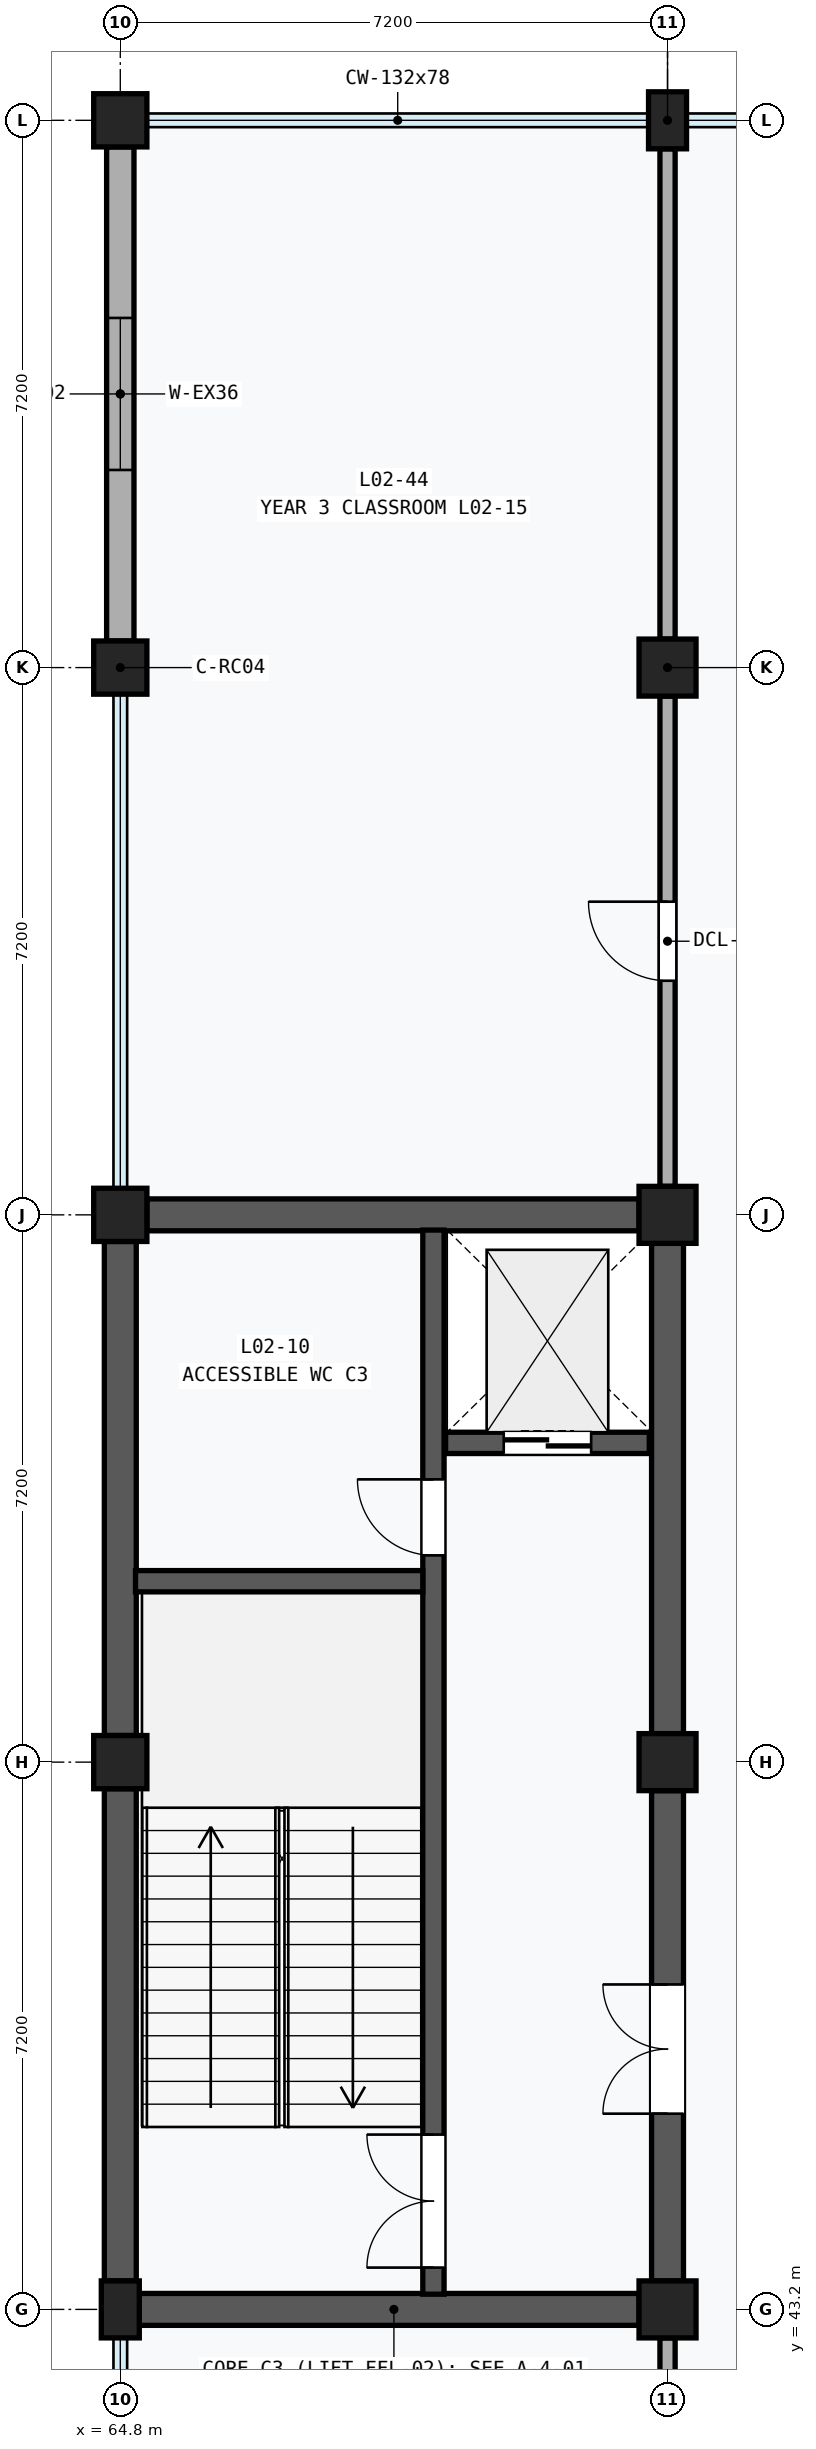
"""IFC4 building model, lengths in metres.
Left out: names, types, materials, properties, quantities, classifications, styles, units other than length and angle.
Written with IfcOpenShell. Run it as: python <this file> out.ifc"""

import sys

from ifc_helpers import new_model, si_unit, direction, frame, frame_2d, origin, origin_2d, place, context, subcontext, project, spatial, rectangle, extrude, element, fill, save


model = new_model("IFC4")
c1 = context("Model", 3, precision=1e-05, world=origin(), true_north=direction((0.0, 1.0)))
c2 = subcontext(c1, "Body", "Model", "MODEL_VIEW")
j1 = project(units=[si_unit("LENGTHUNIT", "METRE"), si_unit("PLANEANGLEUNIT", "RADIAN")], contexts=[c1])
p1 = place(None, origin())
s1 = spatial("IfcSite", under=j1, at=p1, CompositionType="ELEMENT")
p2 = place(p1, origin())
s2 = spatial("IfcBuilding", under=s1, at=p2, CompositionType="ELEMENT")
p3 = place(p2, frame((0.0, 0.0, 9.6)))
s3 = spatial("IfcBuildingStorey", under=s2, at=p3, CompositionType="ELEMENT", Elevation=9.6)
p4 = place(p3, frame((64.8, 43.2, 0.0), z_axis=(0.0, 0.0, 1.0), x_axis=(1.0, 0.0, 0.0)))
e1 = element("IfcColumn", 1, at=p4, inside=s3, PredefinedType="PILASTER", context=c2, shape_type="SweptSolid", body=[
    extrude(rectangle(XDim=0.5, YDim=0.75, at=origin_2d()), origin(), (0.0, 0.0, 1.0), 4.8),
])
for number, where, z_axis, x_axis in (
    (2, (64.8, 50.4, 0.0), (0.0, 0.0, 1.0), (1.0, 0.0, 0.0)),
    (3, (64.8, 57.6, 0.0), (0.0, 0.0, 1.0), (1.0, 0.0, 0.0)),
    (4, (64.8, 64.8, 0.0), (0.0, 0.0, 1.0), (1.0, 0.0, 0.0)),
    (5, (64.8, 72.0, 0.0), (0.0, 0.0, 1.0), (1.0, 0.0, 0.0)),
):
    element("IfcColumn", number, at=place(p3, frame(where, z_axis=z_axis, x_axis=x_axis)), inside=s3, PredefinedType="COLUMN", context=c2, shape_type="SweptSolid", body=[
        extrude(rectangle(XDim=0.7, YDim=0.7, at=origin_2d()), origin(), (0.0, 0.0, 1.0), 4.8),
    ])
for number, where, z_axis, x_axis in (
    (6, (72.0, 43.2, 0.0), (0.0, 0.0, 1.0), (1.0, 0.0, 0.0)),
    (7, (72.0, 50.4, 0.0), (0.0, 0.0, 1.0), (1.0, 0.0, 0.0)),
    (8, (72.0, 57.6, 0.0), (0.0, 0.0, 1.0), (1.0, 0.0, 0.0)),
    (9, (72.0, 64.8, 0.0), (0.0, 0.0, 1.0), (1.0, 0.0, 0.0)),
):
    element("IfcColumn", number, at=place(p3, frame(where, z_axis=z_axis, x_axis=x_axis)), inside=s3, PredefinedType="COLUMN", context=c2, shape_type="SweptSolid", body=[
        extrude(rectangle(XDim=0.75, YDim=0.75, at=origin_2d()), origin(), (0.0, 0.0, 1.0), 4.8),
    ])
p5 = place(p3, frame((72.0, 72.0, 0.0), z_axis=(0.0, 0.0, 1.0), x_axis=(1.0, 0.0, 0.0)))
e10 = element("IfcColumn", 10, at=p5, inside=s3, PredefinedType="PILASTER", context=c2, shape_type="SweptSolid", body=[
    extrude(rectangle(XDim=0.5, YDim=0.75, at=origin_2d()), origin(), (0.0, 0.0, 1.0), 4.8),
])
p6 = place(p3, frame((64.8, 65.15, 0.0), z_axis=(0.0, 0.0, 1.0), x_axis=(0.0, 1.0, 0.0)))
e11 = element("IfcWall", 11, at=p6, inside=s3, PredefinedType="SOLIDWALL", context=c2, shape_type="SweptSolid", body=[
    extrude(rectangle(XDim=6.5, YDim=0.36, at=frame_2d((3.25, 0.0))), origin(), (0.0, 0.0, 1.0), 3.88),
])
p7 = place(p6, frame((2.25, 0.0, 0.9)))
e12 = element("IfcOpeningElement", 12, at=p7, cuts=e11, PredefinedType="OPENING", context=c2, shape_type="SweptSolid", body=[
    extrude(rectangle(XDim=2.0, YDim=1.8, at=frame_2d((1.0, 0.9))), frame((0.0, 0.192, 0.0), z_axis=(0.0, -1.0, 0.0), x_axis=(1.0, 0.0, 0.0)), (0.0, 0.0, 1.0), 0.384),
])
p8 = place(p3, frame((64.8, 43.575, 0.0), z_axis=(0.0, 0.0, 1.0), x_axis=(0.0, 1.0, 0.0)))
e13 = element("IfcWall", 13, at=p8, inside=s3, PredefinedType="SHEAR", context=c2, shape_type="SweptSolid", body=[
    extrude(rectangle(XDim=6.475, YDim=0.42, at=frame_2d((3.238, 0.0))), origin(), (0.0, 0.0, 1.0), 3.88),
])
p9 = place(p3, frame((64.8, 50.75, 0.0), z_axis=(0.0, 0.0, 1.0), x_axis=(0.0, 1.0, 0.0)))
e14 = element("IfcWall", 14, at=p9, inside=s3, PredefinedType="SHEAR", context=c2, shape_type="SweptSolid", body=[
    extrude(rectangle(XDim=6.5, YDim=0.42, at=frame_2d((3.25, 0.0))), origin(), (0.0, 0.0, 1.0), 3.88),
])
p10 = place(p3, frame((72.0, 43.575, 0.0), z_axis=(0.0, 0.0, 1.0), x_axis=(0.0, 1.0, 0.0)))
e15 = element("IfcWall", 15, at=p10, inside=s3, PredefinedType="SHEAR", context=c2, shape_type="SweptSolid", body=[
    extrude(rectangle(XDim=6.45, YDim=0.42, at=frame_2d((3.225, 0.0))), origin(), (0.0, 0.0, 1.0), 3.74),
])
p11 = place(p10, frame((2.2, 0.0, 0.0)))
e16 = element("IfcOpeningElement", 16, at=p11, cuts=e15, PredefinedType="OPENING", context=c2, shape_type="SweptSolid", body=[
    extrude(rectangle(XDim=1.7, YDim=2.25, at=frame_2d((0.85, 1.125))), frame((0.0, 0.222, 0.0), z_axis=(0.0, -1.0, 0.0), x_axis=(1.0, 0.0, 0.0)), (0.0, 0.0, 1.0), 0.444),
])
p12 = place(p3, frame((72.0, 50.775, 0.0), z_axis=(0.0, 0.0, 1.0), x_axis=(0.0, 1.0, 0.0)))
e17 = element("IfcWall", 17, at=p12, inside=s3, PredefinedType="SHEAR", context=c2, shape_type="SweptSolid", body=[
    extrude(rectangle(XDim=6.45, YDim=0.42, at=frame_2d((3.225, 0.0))), origin(), (0.0, 0.0, 1.0), 3.74),
])
p13 = place(p3, frame((65.05, 43.2, 0.0), z_axis=(0.0, 0.0, 1.0), x_axis=(1.0, 0.0, 0.0)))
e18 = element("IfcWall", 18, at=p13, inside=s3, PredefinedType="SHEAR", context=c2, shape_type="SweptSolid", body=[
    extrude(rectangle(XDim=6.575, YDim=0.42, at=frame_2d((3.288, 0.0))), origin(), (0.0, 0.0, 1.0), 3.74),
])
p14 = place(p3, frame((65.15, 57.6, 0.0), z_axis=(0.0, 0.0, 1.0), x_axis=(1.0, 0.0, 0.0)))
e19 = element("IfcWall", 19, at=p14, inside=s3, PredefinedType="SHEAR", context=c2, shape_type="SweptSolid", body=[
    extrude(rectangle(XDim=6.475, YDim=0.42, at=frame_2d((3.238, 0.0))), origin(), (0.0, 0.0, 1.0), 3.74),
])
p15 = place(p3, frame((68.92, 43.4, 0.0), z_axis=(0.0, 0.0, 1.0), x_axis=(0.0, 1.0, 0.0)))
e20 = element("IfcWall", 20, at=p15, inside=s3, PredefinedType="SHEAR", context=c2, shape_type="SweptSolid", body=[
    extrude(rectangle(XDim=14.0, YDim=0.28, at=frame_2d((7.0, 0.0))), origin(), (0.0, 0.0, 1.0), 4.51),
])
p16 = place(p15, frame((0.35, 0.0, 0.0)))
e21 = element("IfcOpeningElement", 21, at=p16, cuts=e20, PredefinedType="OPENING", context=c2, shape_type="SweptSolid", body=[
    extrude(rectangle(XDim=1.75, YDim=2.15, at=frame_2d((0.875, 1.075))), frame((0.0, 0.152, 0.0), z_axis=(0.0, -1.0, 0.0), x_axis=(1.0, 0.0, 0.0)), (0.0, 0.0, 1.0), 0.304),
])
p17 = place(p15, frame((9.72, 0.0, 0.0)))
e22 = element("IfcOpeningElement", 22, at=p17, cuts=e20, PredefinedType="OPENING", context=c2, shape_type="SweptSolid", body=[
    extrude(rectangle(XDim=1.0, YDim=2.15, at=frame_2d((0.5, 1.075))), frame((0.0, 0.152, 0.0), z_axis=(0.0, -1.0, 0.0), x_axis=(1.0, 0.0, 0.0)), (0.0, 0.0, 1.0), 0.304),
])
p18 = place(p3, frame((65.0, 52.78, 0.0), z_axis=(0.0, 0.0, 1.0), x_axis=(1.0, 0.0, 0.0)))
e23 = element("IfcWall", 23, at=p18, inside=s3, PredefinedType="SHEAR", context=c2, shape_type="SweptSolid", body=[
    extrude(rectangle(XDim=3.78, YDim=0.28, at=frame_2d((1.89, 0.0))), origin(), (0.0, 0.0, 1.0), 4.51),
])
p19 = place(p3, frame((69.08, 54.6, 0.0), z_axis=(0.0, 0.0, 1.0), x_axis=(1.0, 0.0, 0.0)))
e24 = element("IfcWall", 24, at=p19, inside=s3, PredefinedType="SHEAR", context=c2, shape_type="SweptSolid", body=[
    extrude(rectangle(XDim=2.68, YDim=0.28, at=frame_2d((1.34, 0.0))), origin(), (0.0, 0.0, 1.0), 4.51),
])
p20 = place(p19, frame((0.765, 0.0, 0.0)))
e25 = element("IfcOpeningElement", 25, at=p20, cuts=e24, PredefinedType="OPENING", context=c2, shape_type="SweptSolid", body=[
    extrude(rectangle(XDim=1.15, YDim=2.2, at=frame_2d((0.575, 1.1))), frame((0.0, 0.152, 0.0), z_axis=(0.0, -1.0, 0.0), x_axis=(1.0, 0.0, 0.0)), (0.0, 0.0, 1.0), 0.304),
])
p21 = place(p3, frame((72.0, 36.375, 0.0), z_axis=(0.0, 0.0, 1.0), x_axis=(0.0, 1.0, 0.0)))
e26 = element("IfcWall", 26, at=p21, inside=s3, PredefinedType="PARTITIONING", context=c2, shape_type="SweptSolid", body=[
    extrude(rectangle(XDim=6.45, YDim=0.2, at=frame_2d((3.225, 0.0))), origin(), (0.0, 0.0, 1.0), 3.74),
])
p22 = place(p3, frame((72.0, 57.975, 0.0), z_axis=(0.0, 0.0, 1.0), x_axis=(0.0, 1.0, 0.0)))
e27 = element("IfcWall", 27, at=p22, inside=s3, PredefinedType="PARTITIONING", context=c2, shape_type="SweptSolid", body=[
    extrude(rectangle(XDim=6.45, YDim=0.2, at=frame_2d((3.225, 0.0))), origin(), (0.0, 0.0, 1.0), 3.74),
])
p23 = place(p22, frame((2.705, 0.0, 0.0)))
e28 = element("IfcOpeningElement", 28, at=p23, cuts=e27, PredefinedType="OPENING", context=c2, shape_type="SweptSolid", body=[
    extrude(rectangle(XDim=1.04, YDim=2.14, at=frame_2d((0.52, 1.07))), frame((0.0, 0.112, 0.0), z_axis=(0.0, -1.0, 0.0), x_axis=(1.0, 0.0, 0.0)), (0.0, 0.0, 1.0), 0.224),
])
p24 = place(p3, frame((72.0, 65.175, 0.0), z_axis=(0.0, 0.0, 1.0), x_axis=(0.0, 1.0, 0.0)))
e29 = element("IfcWall", 29, at=p24, inside=s3, PredefinedType="PARTITIONING", context=c2, shape_type="SweptSolid", body=[
    extrude(rectangle(XDim=6.45, YDim=0.2, at=frame_2d((3.225, 0.0))), origin(), (0.0, 0.0, 1.0), 3.74),
])
p25 = place(p7, origin())
e30 = element("IfcWindow", 30, at=p25, inside=s3, PartitioningType="SINGLE_PANEL", PredefinedType="WINDOW", context=c2, shape_type="SweptSolid", body=[
    extrude(rectangle(XDim=2.0, YDim=1.8, at=frame_2d((1.0, 0.9))), frame((0.0, 0.03, 0.0), z_axis=(0.0, -1.0, 0.0), x_axis=(1.0, 0.0, 0.0)), (0.0, 0.0, 1.0), 0.06),
])
fill(e12, e30)
p26 = place(p11, origin())
e31 = element("IfcDoor", 31, at=p26, inside=s3, OperationType="DOUBLE_DOOR_SINGLE_SWING", PredefinedType="DOOR", context=c2, shape_type="SweptSolid", body=[
    extrude(rectangle(XDim=1.7, YDim=2.25, at=frame_2d((0.85, 1.125))), frame((0.0, 0.025, 0.0), z_axis=(0.0, -1.0, 0.0), x_axis=(1.0, 0.0, 0.0)), (0.0, 0.0, 1.0), 0.05),
])
fill(e16, e31)
p27 = place(p16, origin())
e32 = element("IfcDoor", 32, at=p27, inside=s3, OperationType="DOUBLE_DOOR_SINGLE_SWING", PredefinedType="DOOR", context=c2, shape_type="SweptSolid", body=[
    extrude(rectangle(XDim=1.75, YDim=2.15, at=frame_2d((0.875, 1.075))), frame((0.0, 0.025, 0.0), z_axis=(0.0, -1.0, 0.0), x_axis=(1.0, 0.0, 0.0)), (0.0, 0.0, 1.0), 0.05),
])
fill(e21, e32)
p28 = place(p17, origin())
e33 = element("IfcDoor", 33, at=p28, inside=s3, OperationType="SINGLE_SWING_RIGHT", PredefinedType="DOOR", context=c2, shape_type="SweptSolid", body=[
    extrude(rectangle(XDim=1.0, YDim=2.15, at=frame_2d((0.5, 1.075))), frame((0.0, 0.025, 0.0), z_axis=(0.0, -1.0, 0.0), x_axis=(1.0, 0.0, 0.0)), (0.0, 0.0, 1.0), 0.05),
])
fill(e22, e33)
p29 = place(p20, frame((1.15, 0.0, 0.0), z_axis=(0.0, 0.0, 1.0), x_axis=(-1.0, 0.0, 0.0)))
e34 = element("IfcDoor", 34, at=p29, inside=s3, OperationType="DOUBLE_DOOR_SLIDING", PredefinedType="DOOR", context=c2, shape_type="SweptSolid", body=[
    extrude(rectangle(XDim=1.15, YDim=2.2, at=frame_2d((0.575, 1.1))), frame((0.0, 0.025, 0.0), z_axis=(0.0, -1.0, 0.0), x_axis=(1.0, 0.0, 0.0)), (0.0, 0.0, 1.0), 0.05),
])
fill(e25, e34)
p30 = place(p23, origin())
e35 = element("IfcDoor", 35, at=p30, inside=s3, OperationType="SINGLE_SWING_RIGHT", PredefinedType="DOOR", context=c2, shape_type="SweptSolid", body=[
    extrude(rectangle(XDim=1.04, YDim=2.14, at=frame_2d((0.52, 1.07))), frame((0.0, 0.025, 0.0), z_axis=(0.0, -1.0, 0.0), x_axis=(1.0, 0.0, 0.0)), (0.0, 0.0, 1.0), 0.05),
])
fill(e28, e35)
save(model, sys.argv[1])
